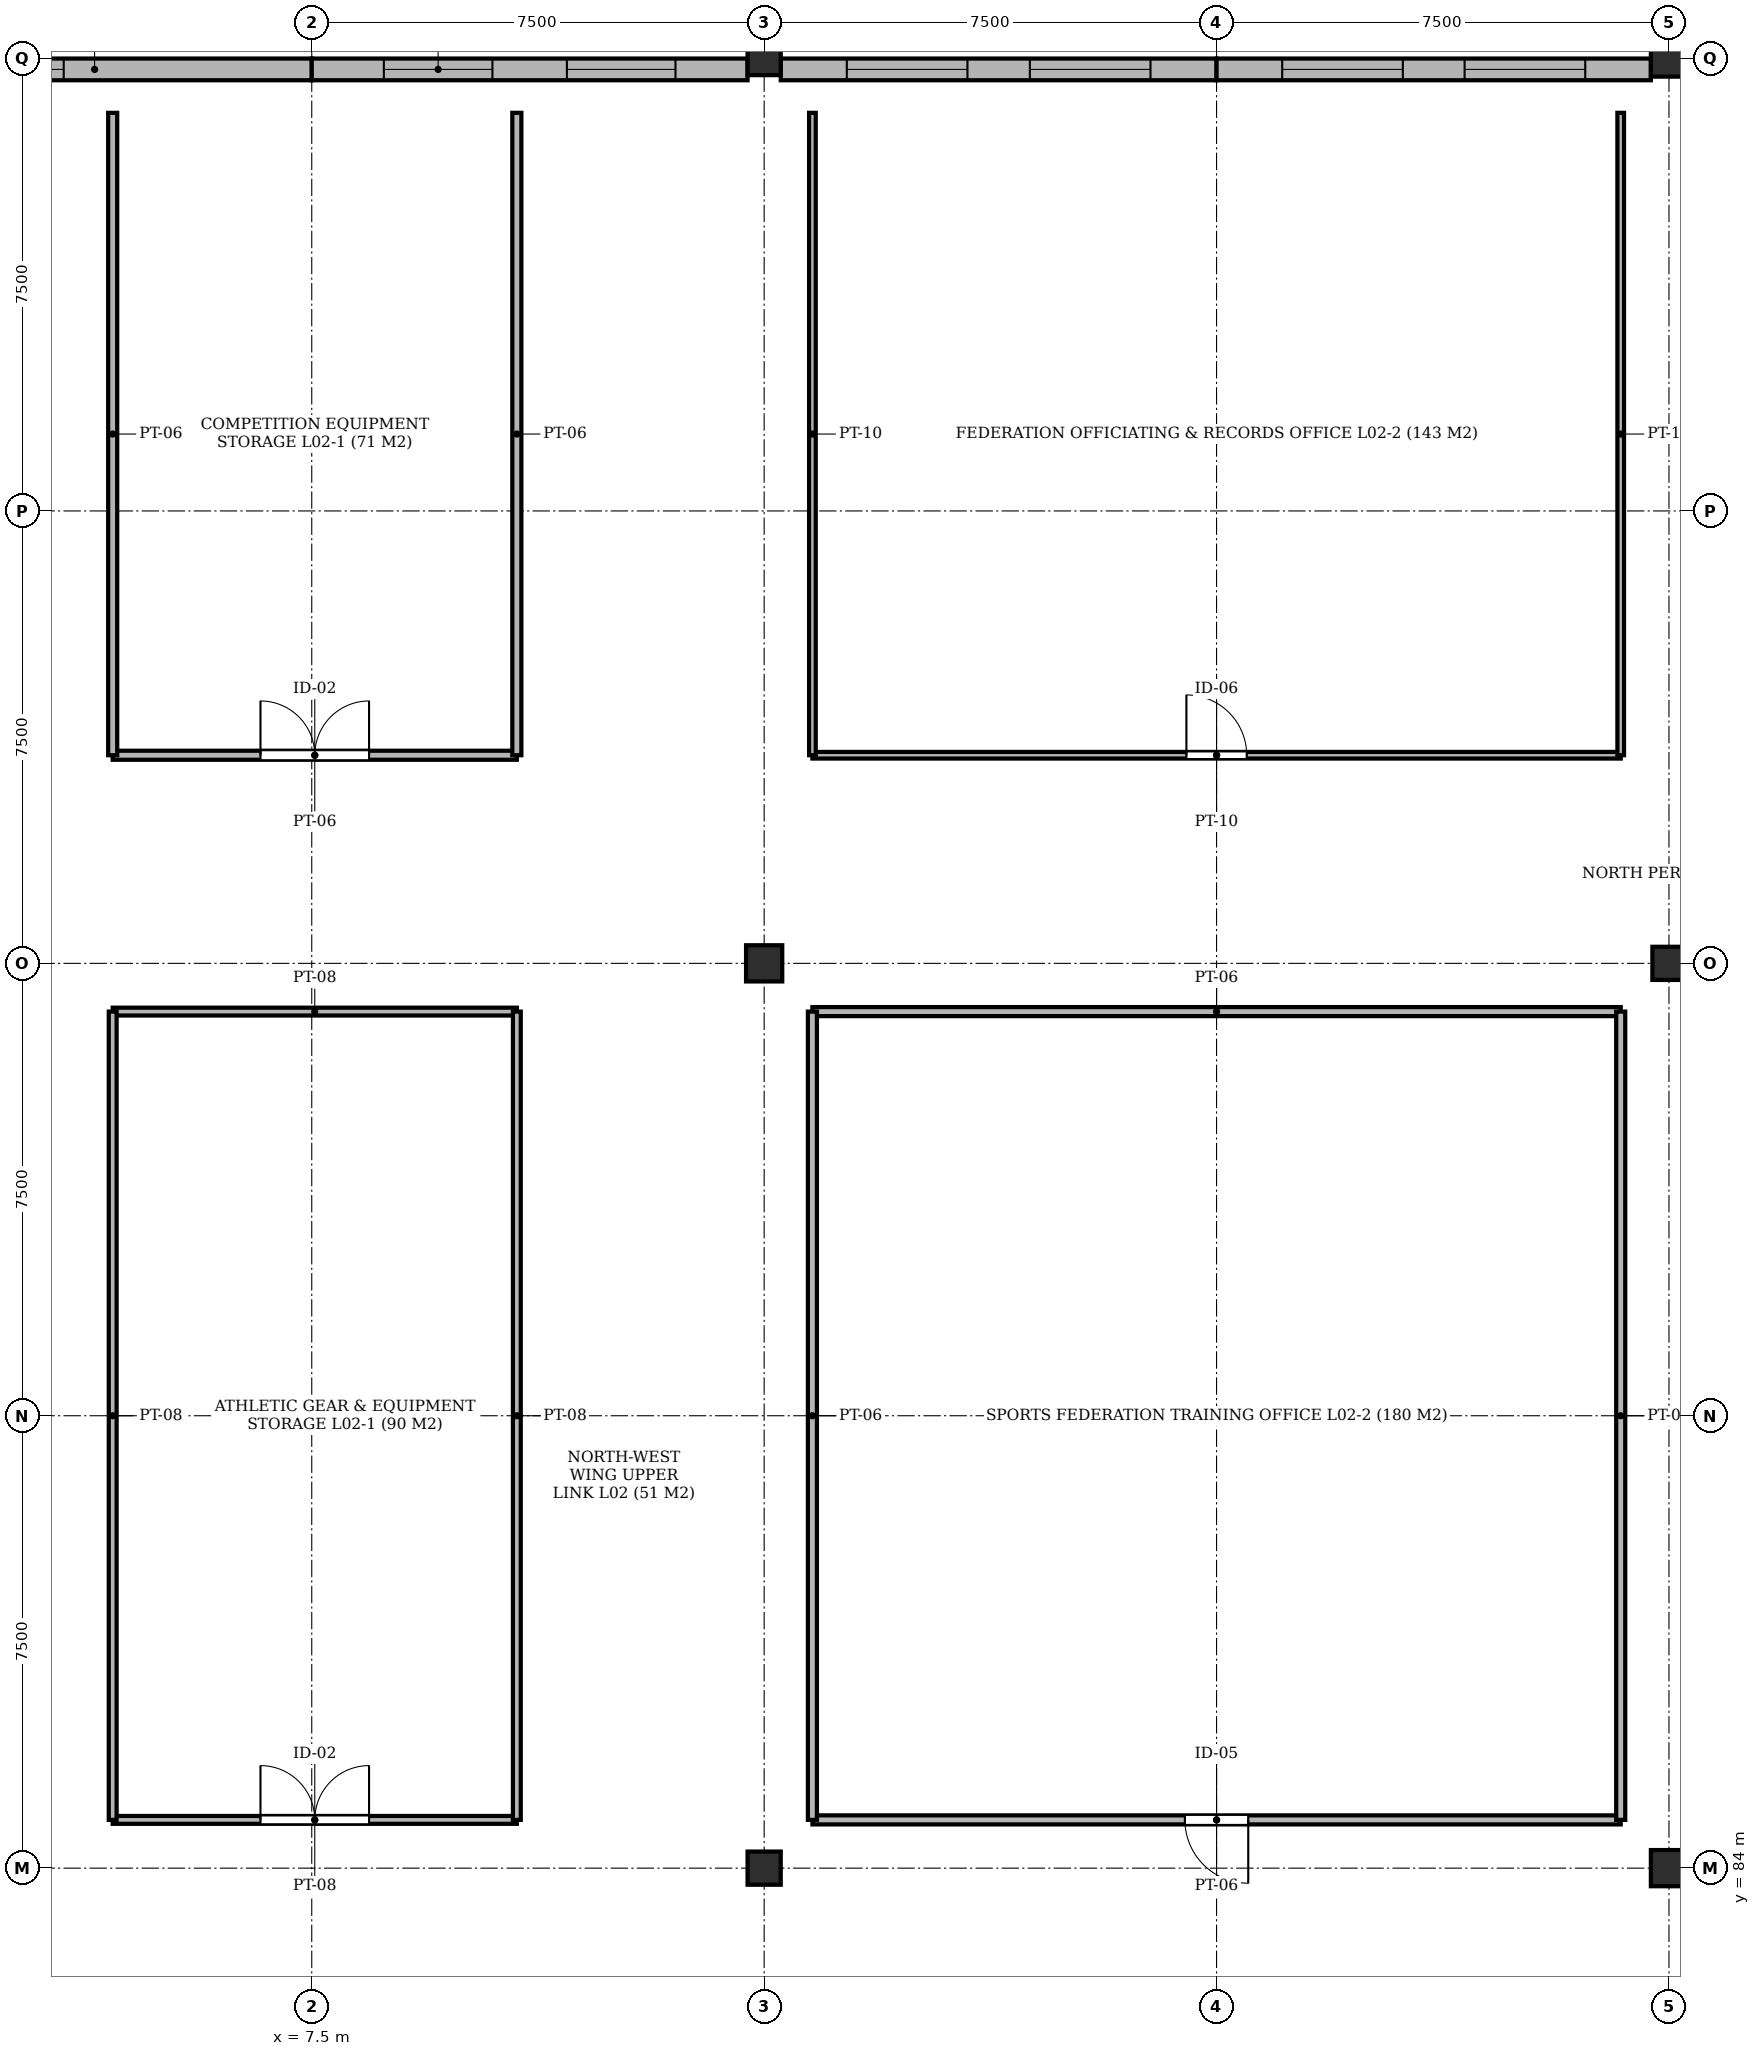
"""IFC4 building model, lengths in metres.
Left out: names, types, materials, properties, quantities, classifications, styles, units other than length and angle.
Written with IfcOpenShell. Run it as: python <this file> out.ifc"""

import sys

from ifc_helpers import new_model, si_unit, direction, frame, frame_2d, origin, origin_2d, place, context, subcontext, project, spatial, rectangle, extrude, element, fill, save


model = new_model("IFC4")
c1 = context("Model", 3, precision=1e-05, world=origin(), true_north=direction((0.0, 1.0)))
c2 = subcontext(c1, "Body", "Model", "MODEL_VIEW")
j1 = project(units=[si_unit("LENGTHUNIT", "METRE"), si_unit("PLANEANGLEUNIT", "RADIAN")], contexts=[c1])
p1 = place(None, origin())
s1 = spatial("IfcSite", under=j1, at=p1, CompositionType="ELEMENT")
p2 = place(p1, origin())
s2 = spatial("IfcBuilding", under=s1, at=p2, CompositionType="ELEMENT")
p3 = place(p2, frame((0.0, 0.0, 9.4)))
s3 = spatial("IfcBuildingStorey", under=s2, at=p3, CompositionType="ELEMENT", Elevation=9.4)
p4 = place(p3, frame((15.0, 84.0, -0.45), z_axis=(0.0, 0.0, 1.0), x_axis=(1.0, 0.0, 0.0)))
e1 = element("IfcColumn", 1, at=p4, inside=s3, PredefinedType="COLUMN", context=c2, shape_type="SweptSolid", body=[
    extrude(rectangle(XDim=0.55, YDim=0.55, at=origin_2d()), origin(), (0.0, 0.0, 1.0), 4.77),
])
p5 = place(p3, frame((15.0, 99.0, -0.45), z_axis=(0.0, 0.0, 1.0), x_axis=(1.0, 0.0, 0.0)))
e2 = element("IfcColumn", 2, at=p5, inside=s3, PredefinedType="COLUMN", context=c2, shape_type="SweptSolid", body=[
    extrude(rectangle(XDim=0.6, YDim=0.6, at=origin_2d()), origin(), (0.0, 0.0, 1.0), 4.77),
])
p6 = place(p3, frame((15.0, 114.0, -0.45), z_axis=(0.0, 0.0, 1.0), x_axis=(1.0, 0.0, 0.0)))
e3 = element("IfcColumn", 3, at=p6, inside=s3, PredefinedType="COLUMN", context=c2, shape_type="SweptSolid", body=[
    extrude(rectangle(XDim=0.55, YDim=0.55, at=origin_2d()), origin(), (0.0, 0.0, 1.0), 4.77),
])
p7 = place(p3, frame((30.0, 84.0, -0.45), z_axis=(0.0, 0.0, 1.0), x_axis=(1.0, 0.0, 0.0)))
e4 = element("IfcColumn", 4, at=p7, inside=s3, PredefinedType="COLUMN", context=c2, shape_type="SweptSolid", body=[
    extrude(rectangle(XDim=0.6, YDim=0.6, at=origin_2d()), origin(), (0.0, 0.0, 1.0), 4.77),
])
p8 = place(p3, frame((30.0, 99.0, -0.45), z_axis=(0.0, 0.0, 1.0), x_axis=(1.0, 0.0, 0.0)))
e5 = element("IfcColumn", 5, at=p8, inside=s3, PredefinedType="COLUMN", context=c2, shape_type="SweptSolid", body=[
    extrude(rectangle(XDim=0.55, YDim=0.55, at=origin_2d()), origin(), (0.0, 0.0, 1.0), 4.77),
])
p9 = place(p3, frame((30.0, 114.0, -0.45), z_axis=(0.0, 0.0, 1.0), x_axis=(1.0, 0.0, 0.0)))
e6 = element("IfcColumn", 6, at=p9, inside=s3, PredefinedType="COLUMN", context=c2, shape_type="SweptSolid", body=[
    extrude(rectangle(XDim=0.6, YDim=0.6, at=origin_2d()), origin(), (0.0, 0.0, 1.0), 4.77),
])
p10 = place(p3, frame((7.5, 113.82, 0.0), z_axis=(0.0, 0.0, 1.0), x_axis=(-1.0, 0.0, 0.0)))
e7 = element("IfcWall", 7, at=p10, inside=s3, PredefinedType="SOLIDWALL", context=c2, shape_type="SweptSolid", body=[
    extrude(rectangle(XDim=7.2, YDim=0.36, at=frame_2d((3.6, 0.0))), origin(), (0.0, 0.0, 1.0), 3.45),
])
p11 = place(p10, frame((4.112, 0.0, 0.92)))
e8 = element("IfcOpeningElement", 8, at=p11, cuts=e7, PredefinedType="OPENING", context=c2, shape_type="SweptSolid", body=[
    extrude(rectangle(XDim=2.0, YDim=2.1, at=frame_2d((1.0, 1.05))), frame((0.0, 0.192, 0.0), z_axis=(0.0, -1.0, 0.0), x_axis=(1.0, 0.0, 0.0)), (0.0, 0.0, 1.0), 0.384),
])
p12 = place(p3, frame((14.725, 113.82, 0.0), z_axis=(0.0, 0.0, 1.0), x_axis=(-1.0, 0.0, 0.0)))
e9 = element("IfcWall", 9, at=p12, inside=s3, PredefinedType="SOLIDWALL", context=c2, shape_type="SweptSolid", body=[
    extrude(rectangle(XDim=7.225, YDim=0.36, at=frame_2d((3.613, 0.0))), origin(), (0.0, 0.0, 1.0), 3.45),
])
p13 = place(p12, frame((4.23, 0.0, 0.92)))
e10 = element("IfcOpeningElement", 10, at=p13, cuts=e9, PredefinedType="OPENING", context=c2, shape_type="SweptSolid", body=[
    extrude(rectangle(XDim=1.8, YDim=2.1, at=frame_2d((0.9, 1.05))), frame((0.0, 0.192, 0.0), z_axis=(0.0, -1.0, 0.0), x_axis=(1.0, 0.0, 0.0)), (0.0, 0.0, 1.0), 0.384),
])
p14 = place(p12, frame((1.195, 0.0, 0.92)))
e11 = element("IfcOpeningElement", 11, at=p14, cuts=e9, PredefinedType="OPENING", context=c2, shape_type="SweptSolid", body=[
    extrude(rectangle(XDim=1.8, YDim=2.1, at=frame_2d((0.9, 1.05))), frame((0.0, 0.192, 0.0), z_axis=(0.0, -1.0, 0.0), x_axis=(1.0, 0.0, 0.0)), (0.0, 0.0, 1.0), 0.384),
])
p15 = place(p3, frame((22.5, 113.82, 0.0), z_axis=(0.0, 0.0, 1.0), x_axis=(-1.0, 0.0, 0.0)))
e12 = element("IfcWall", 12, at=p15, inside=s3, PredefinedType="SOLIDWALL", context=c2, shape_type="SweptSolid", body=[
    extrude(rectangle(XDim=7.225, YDim=0.36, at=frame_2d((3.613, 0.0))), origin(), (0.0, 0.0, 1.0), 3.45),
])
p16 = place(p15, frame((4.13, 0.0, 0.92)))
e13 = element("IfcOpeningElement", 13, at=p16, cuts=e12, PredefinedType="OPENING", context=c2, shape_type="SweptSolid", body=[
    extrude(rectangle(XDim=2.0, YDim=2.1, at=frame_2d((1.0, 1.05))), frame((0.0, 0.192, 0.0), z_axis=(0.0, -1.0, 0.0), x_axis=(1.0, 0.0, 0.0)), (0.0, 0.0, 1.0), 0.384),
])
p17 = place(p15, frame((1.095, 0.0, 0.92)))
e14 = element("IfcOpeningElement", 14, at=p17, cuts=e12, PredefinedType="OPENING", context=c2, shape_type="SweptSolid", body=[
    extrude(rectangle(XDim=2.0, YDim=2.1, at=frame_2d((1.0, 1.05))), frame((0.0, 0.192, 0.0), z_axis=(0.0, -1.0, 0.0), x_axis=(1.0, 0.0, 0.0)), (0.0, 0.0, 1.0), 0.384),
])
p18 = place(p3, frame((29.7, 113.82, 0.0), z_axis=(0.0, 0.0, 1.0), x_axis=(-1.0, 0.0, 0.0)))
e15 = element("IfcWall", 15, at=p18, inside=s3, PredefinedType="SOLIDWALL", context=c2, shape_type="SweptSolid", body=[
    extrude(rectangle(XDim=7.2, YDim=0.36, at=frame_2d((3.6, 0.0))), origin(), (0.0, 0.0, 1.0), 3.45),
])
p19 = place(p18, frame((4.112, 0.0, 0.92)))
e16 = element("IfcOpeningElement", 16, at=p19, cuts=e15, PredefinedType="OPENING", context=c2, shape_type="SweptSolid", body=[
    extrude(rectangle(XDim=2.0, YDim=2.1, at=frame_2d((1.0, 1.05))), frame((0.0, 0.192, 0.0), z_axis=(0.0, -1.0, 0.0), x_axis=(1.0, 0.0, 0.0)), (0.0, 0.0, 1.0), 0.384),
])
p20 = place(p18, frame((1.088, 0.0, 0.92)))
e17 = element("IfcOpeningElement", 17, at=p20, cuts=e15, PredefinedType="OPENING", context=c2, shape_type="SweptSolid", body=[
    extrude(rectangle(XDim=2.0, YDim=2.1, at=frame_2d((1.0, 1.05))), frame((0.0, 0.192, 0.0), z_axis=(0.0, -1.0, 0.0), x_axis=(1.0, 0.0, 0.0)), (0.0, 0.0, 1.0), 0.384),
])
p21 = place(p3, frame((4.2, 84.8, 0.0), z_axis=(0.0, 0.0, 1.0), x_axis=(1.0, 0.0, 0.0)))
e18 = element("IfcWall", 18, at=p21, inside=s3, PredefinedType="PARTITIONING", context=c2, shape_type="SweptSolid", body=[
    extrude(rectangle(XDim=6.7, YDim=0.13, at=frame_2d((3.35, 0.0))), origin(), (0.0, 0.0, 1.0), 3.88),
])
p22 = place(p21, frame((2.45, 0.0, 0.0)))
e19 = element("IfcOpeningElement", 19, at=p22, cuts=e18, PredefinedType="OPENING", context=c2, shape_type="SweptSolid", body=[
    extrude(rectangle(XDim=1.8, YDim=2.25, at=frame_2d((0.9, 1.125))), frame((0.0, 0.077, 0.0), z_axis=(0.0, -1.0, 0.0), x_axis=(1.0, 0.0, 0.0)), (0.0, 0.0, 1.0), 0.154),
])
p23 = place(p3, frame((4.2, 98.2, 0.0), z_axis=(0.0, 0.0, 1.0), x_axis=(1.0, 0.0, 0.0)))
e20 = element("IfcWall", 20, at=p23, inside=s3, PredefinedType="PARTITIONING", context=c2, shape_type="SweptSolid", body=[
    extrude(rectangle(XDim=6.7, YDim=0.13, at=frame_2d((3.35, 0.0))), origin(), (0.0, 0.0, 1.0), 3.88),
])
for number, where, z_axis, x_axis in (
    (21, (4.2, 84.8, 0.0), (0.0, 0.0, 1.0), (0.0, 1.0, 0.0)),
    (22, (10.9, 84.8, 0.0), (0.0, 0.0, 1.0), (0.0, 1.0, 0.0)),
):
    element("IfcWall", number, at=place(p3, frame(where, z_axis=z_axis, x_axis=x_axis)), inside=s3, PredefinedType="PARTITIONING", context=c2, shape_type="SweptSolid", body=[
        extrude(rectangle(XDim=13.4, YDim=0.13, at=frame_2d((6.7, 0.0))), origin(), (0.0, 0.0, 1.0), 3.88),
    ])
p24 = place(p3, frame((15.8, 84.8, 0.0), z_axis=(0.0, 0.0, 1.0), x_axis=(1.0, 0.0, 0.0)))
e23 = element("IfcWall", 23, at=p24, inside=s3, PredefinedType="PARTITIONING", context=c2, shape_type="SweptSolid", body=[
    extrude(rectangle(XDim=13.4, YDim=0.15, at=frame_2d((6.7, 0.0))), origin(), (0.0, 0.0, 1.0), 3.88),
])
p25 = place(p24, frame((6.175, 0.0, 0.0)))
e24 = element("IfcOpeningElement", 24, at=p25, cuts=e23, PredefinedType="OPENING", context=c2, shape_type="SweptSolid", body=[
    extrude(rectangle(XDim=1.05, YDim=2.15, at=frame_2d((0.525, 1.075))), frame((0.0, 0.087, 0.0), z_axis=(0.0, -1.0, 0.0), x_axis=(1.0, 0.0, 0.0)), (0.0, 0.0, 1.0), 0.174),
])
for number, where, z_axis, x_axis in (
    (25, (15.8, 98.2, 0.0), (0.0, 0.0, 1.0), (1.0, 0.0, 0.0)),
    (26, (15.8, 84.8, 0.0), (0.0, 0.0, 1.0), (0.0, 1.0, 0.0)),
    (27, (29.2, 84.8, 0.0), (0.0, 0.0, 1.0), (0.0, 1.0, 0.0)),
):
    element("IfcWall", number, at=place(p3, frame(where, z_axis=z_axis, x_axis=x_axis)), inside=s3, PredefinedType="PARTITIONING", context=c2, shape_type="SweptSolid", body=[
        extrude(rectangle(XDim=13.4, YDim=0.15, at=frame_2d((6.7, 0.0))), origin(), (0.0, 0.0, 1.0), 3.88),
    ])
p26 = place(p3, frame((4.2, 102.45, 0.0), z_axis=(0.0, 0.0, 1.0), x_axis=(1.0, 0.0, 0.0)))
e28 = element("IfcWall", 28, at=p26, inside=s3, PredefinedType="PARTITIONING", context=c2, shape_type="SweptSolid", body=[
    extrude(rectangle(XDim=6.7, YDim=0.15, at=frame_2d((3.35, 0.0))), origin(), (0.0, 0.0, 1.0), 3.88),
])
p27 = place(p26, frame((2.45, 0.0, 0.0)))
e29 = element("IfcOpeningElement", 29, at=p27, cuts=e28, PredefinedType="OPENING", context=c2, shape_type="SweptSolid", body=[
    extrude(rectangle(XDim=1.8, YDim=2.25, at=frame_2d((0.9, 1.125))), frame((0.0, 0.087, 0.0), z_axis=(0.0, -1.0, 0.0), x_axis=(1.0, 0.0, 0.0)), (0.0, 0.0, 1.0), 0.174),
])
for number, where, z_axis, x_axis in (
    (30, (4.2, 102.45, 0.0), (0.0, 0.0, 1.0), (0.0, 1.0, 0.0)),
    (31, (10.9, 102.45, 0.0), (0.0, 0.0, 1.0), (0.0, 1.0, 0.0)),
):
    element("IfcWall", number, at=place(p3, frame(where, z_axis=z_axis, x_axis=x_axis)), inside=s3, PredefinedType="PARTITIONING", context=c2, shape_type="SweptSolid", body=[
        extrude(rectangle(XDim=10.65, YDim=0.15, at=frame_2d((5.325, 0.0))), origin(), (0.0, 0.0, 1.0), 3.88),
    ])
p28 = place(p3, frame((15.8, 102.45, 0.0), z_axis=(0.0, 0.0, 1.0), x_axis=(1.0, 0.0, 0.0)))
e32 = element("IfcWall", 32, at=p28, inside=s3, PredefinedType="PARTITIONING", context=c2, shape_type="SweptSolid", body=[
    extrude(rectangle(XDim=13.4, YDim=0.11, at=frame_2d((6.7, 0.0))), origin(), (0.0, 0.0, 1.0), 3.88),
])
p29 = place(p28, frame((6.2, 0.0, 0.0)))
e33 = element("IfcOpeningElement", 33, at=p29, cuts=e32, PredefinedType="OPENING", context=c2, shape_type="SweptSolid", body=[
    extrude(rectangle(XDim=1.0, YDim=2.15, at=frame_2d((0.5, 1.075))), frame((0.0, 0.067, 0.0), z_axis=(0.0, -1.0, 0.0), x_axis=(1.0, 0.0, 0.0)), (0.0, 0.0, 1.0), 0.134),
])
for number, where, z_axis, x_axis in (
    (34, (15.8, 102.45, 0.0), (0.0, 0.0, 1.0), (0.0, 1.0, 0.0)),
    (35, (29.2, 102.45, 0.0), (0.0, 0.0, 1.0), (0.0, 1.0, 0.0)),
):
    element("IfcWall", number, at=place(p3, frame(where, z_axis=z_axis, x_axis=x_axis)), inside=s3, PredefinedType="PARTITIONING", context=c2, shape_type="SweptSolid", body=[
        extrude(rectangle(XDim=10.65, YDim=0.11, at=frame_2d((5.325, 0.0))), origin(), (0.0, 0.0, 1.0), 3.88),
    ])
p30 = place(p11, origin())
e36 = element("IfcWindow", 36, at=p30, inside=s3, PartitioningType="SINGLE_PANEL", PredefinedType="WINDOW", context=c2, shape_type="SweptSolid", body=[
    extrude(rectangle(XDim=2.0, YDim=2.1, at=frame_2d((1.0, 1.05))), frame((0.0, 0.03, 0.0), z_axis=(0.0, -1.0, 0.0), x_axis=(1.0, 0.0, 0.0)), (0.0, 0.0, 1.0), 0.06),
])
fill(e8, e36)
p31 = place(p13, origin())
e37 = element("IfcWindow", 37, at=p31, inside=s3, PartitioningType="SINGLE_PANEL", PredefinedType="WINDOW", context=c2, shape_type="SweptSolid", body=[
    extrude(rectangle(XDim=1.8, YDim=2.1, at=frame_2d((0.9, 1.05))), frame((0.0, 0.03, 0.0), z_axis=(0.0, -1.0, 0.0), x_axis=(1.0, 0.0, 0.0)), (0.0, 0.0, 1.0), 0.06),
])
fill(e10, e37)
p32 = place(p14, origin())
e38 = element("IfcWindow", 38, at=p32, inside=s3, PartitioningType="SINGLE_PANEL", PredefinedType="WINDOW", context=c2, shape_type="SweptSolid", body=[
    extrude(rectangle(XDim=1.8, YDim=2.1, at=frame_2d((0.9, 1.05))), frame((0.0, 0.03, 0.0), z_axis=(0.0, -1.0, 0.0), x_axis=(1.0, 0.0, 0.0)), (0.0, 0.0, 1.0), 0.06),
])
fill(e11, e38)
p33 = place(p16, origin())
e39 = element("IfcWindow", 39, at=p33, inside=s3, PartitioningType="SINGLE_PANEL", PredefinedType="WINDOW", context=c2, shape_type="SweptSolid", body=[
    extrude(rectangle(XDim=2.0, YDim=2.1, at=frame_2d((1.0, 1.05))), frame((0.0, 0.03, 0.0), z_axis=(0.0, -1.0, 0.0), x_axis=(1.0, 0.0, 0.0)), (0.0, 0.0, 1.0), 0.06),
])
fill(e13, e39)
p34 = place(p17, origin())
e40 = element("IfcWindow", 40, at=p34, inside=s3, PartitioningType="SINGLE_PANEL", PredefinedType="WINDOW", context=c2, shape_type="SweptSolid", body=[
    extrude(rectangle(XDim=2.0, YDim=2.1, at=frame_2d((1.0, 1.05))), frame((0.0, 0.03, 0.0), z_axis=(0.0, -1.0, 0.0), x_axis=(1.0, 0.0, 0.0)), (0.0, 0.0, 1.0), 0.06),
])
fill(e14, e40)
p35 = place(p19, origin())
e41 = element("IfcWindow", 41, at=p35, inside=s3, PartitioningType="SINGLE_PANEL", PredefinedType="WINDOW", context=c2, shape_type="SweptSolid", body=[
    extrude(rectangle(XDim=2.0, YDim=2.1, at=frame_2d((1.0, 1.05))), frame((0.0, 0.03, 0.0), z_axis=(0.0, -1.0, 0.0), x_axis=(1.0, 0.0, 0.0)), (0.0, 0.0, 1.0), 0.06),
])
fill(e16, e41)
p36 = place(p20, origin())
e42 = element("IfcWindow", 42, at=p36, inside=s3, PartitioningType="SINGLE_PANEL", PredefinedType="WINDOW", context=c2, shape_type="SweptSolid", body=[
    extrude(rectangle(XDim=2.0, YDim=2.1, at=frame_2d((1.0, 1.05))), frame((0.0, 0.03, 0.0), z_axis=(0.0, -1.0, 0.0), x_axis=(1.0, 0.0, 0.0)), (0.0, 0.0, 1.0), 0.06),
])
fill(e17, e42)
p37 = place(p22, origin())
e43 = element("IfcDoor", 43, at=p37, inside=s3, OperationType="DOUBLE_DOOR_SINGLE_SWING", PredefinedType="DOOR", context=c2, shape_type="SweptSolid", body=[
    extrude(rectangle(XDim=1.8, YDim=2.25, at=frame_2d((0.9, 1.125))), frame((0.0, 0.025, 0.0), z_axis=(0.0, -1.0, 0.0), x_axis=(1.0, 0.0, 0.0)), (0.0, 0.0, 1.0), 0.05),
])
fill(e19, e43)
p38 = place(p25, frame((1.05, 0.0, 0.0), z_axis=(0.0, 0.0, 1.0), x_axis=(-1.0, 0.0, 0.0)))
e44 = element("IfcDoor", 44, at=p38, inside=s3, OperationType="SINGLE_SWING_RIGHT", PredefinedType="DOOR", context=c2, shape_type="SweptSolid", body=[
    extrude(rectangle(XDim=1.05, YDim=2.15, at=frame_2d((0.525, 1.075))), frame((0.0, 0.025, 0.0), z_axis=(0.0, -1.0, 0.0), x_axis=(1.0, 0.0, 0.0)), (0.0, 0.0, 1.0), 0.05),
])
fill(e24, e44)
p39 = place(p27, origin())
e45 = element("IfcDoor", 45, at=p39, inside=s3, OperationType="DOUBLE_DOOR_SINGLE_SWING", PredefinedType="DOOR", context=c2, shape_type="SweptSolid", body=[
    extrude(rectangle(XDim=1.8, YDim=2.25, at=frame_2d((0.9, 1.125))), frame((0.0, 0.025, 0.0), z_axis=(0.0, -1.0, 0.0), x_axis=(1.0, 0.0, 0.0)), (0.0, 0.0, 1.0), 0.05),
])
fill(e29, e45)
p40 = place(p29, origin())
e46 = element("IfcDoor", 46, at=p40, inside=s3, OperationType="SINGLE_SWING_LEFT", PredefinedType="DOOR", context=c2, shape_type="SweptSolid", body=[
    extrude(rectangle(XDim=1.0, YDim=2.15, at=frame_2d((0.5, 1.075))), frame((0.0, 0.025, 0.0), z_axis=(0.0, -1.0, 0.0), x_axis=(1.0, 0.0, 0.0)), (0.0, 0.0, 1.0), 0.05),
])
fill(e33, e46)
save(model, sys.argv[1])
